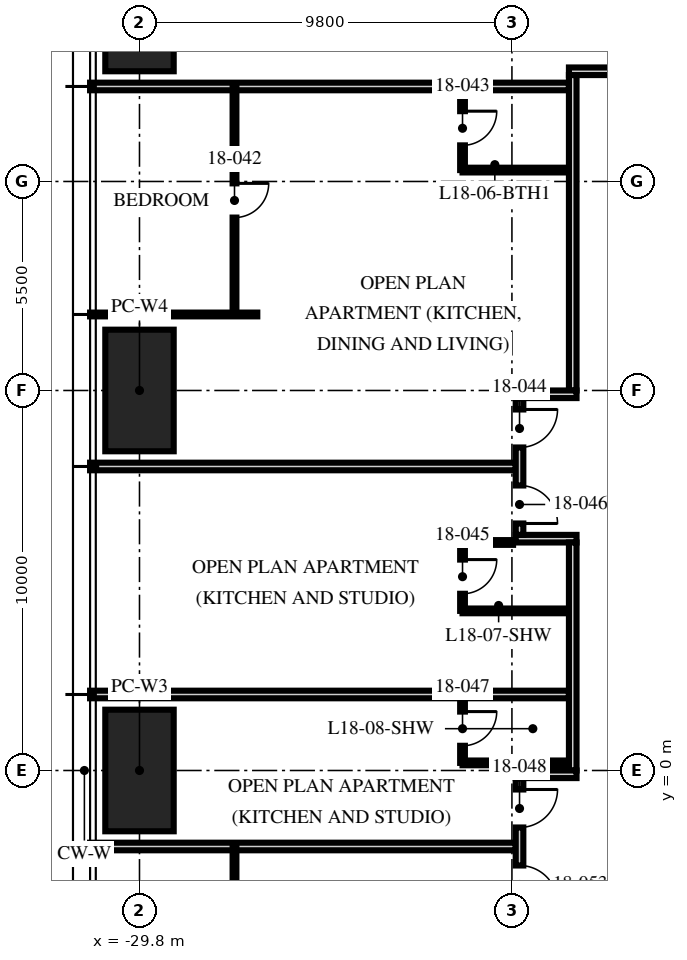
"""IFC4 building model, lengths in metres.
Left out: names, types, materials, properties, quantities, classifications, styles, units other than length and angle.
Written with IfcOpenShell. Run it as: python <this file> out.ifc"""

import sys

from ifc_helpers import new_model, si_unit, direction, frame, frame_2d, origin, origin_2d, place, context, subcontext, project, spatial, rectangle, hollow_rectangle, extrude, element, fill, save


model = new_model("IFC4")
c1 = context("Model", 3, precision=1e-05, world=origin(), true_north=direction((0.0, 1.0)))
c2 = subcontext(c1, "Body", "Model", "MODEL_VIEW")
j1 = project(units=[si_unit("LENGTHUNIT", "METRE"), si_unit("PLANEANGLEUNIT", "RADIAN")], contexts=[c1])
p1 = place(None, origin())
s1 = spatial("IfcSite", under=j1, at=p1, CompositionType="ELEMENT")
p2 = place(p1, origin())
s2 = spatial("IfcBuilding", under=s1, at=p2, CompositionType="ELEMENT")
p3 = place(p2, frame((0.0, 0.0, 73.5)))
s3 = spatial("IfcBuildingStorey", under=s2, at=p3, CompositionType="ELEMENT", Elevation=73.5)
for number, where, z_axis, x_axis in (
    (1, (-29.8, 0.0, 0.0), (0.0, 0.0, 1.0), (0.0, 1.0, 0.0)),
    (2, (-29.8, 10.0, 0.0), (0.0, 0.0, 1.0), (0.0, 1.0, 0.0)),
    (3, (-29.8, 20.0, 0.0), (0.0, 0.0, 1.0), (0.0, 1.0, 0.0)),
):
    element("IfcColumn", number, at=place(p3, frame(where, z_axis=z_axis, x_axis=x_axis)), inside=s3, PredefinedType="COLUMN", context=c2, shape_type="SweptSolid", body=[
        extrude(hollow_rectangle(XDim=3.2, YDim=1.8, WallThickness=0.2, at=origin_2d()), origin(), (0.0, 0.0, 1.0), 3.75),
    ])
p4 = place(p3, frame((-18.5, 18.0, 0.0), z_axis=(0.0, 0.0, 1.0), x_axis=(-1.0, 0.0, 0.0)))
e4 = element("IfcWall", 4, at=p4, inside=s3, PredefinedType="PARTITIONING", context=c2, shape_type="SweptSolid", body=[
    extrude(rectangle(XDim=12.6, YDim=0.2, at=frame_2d((6.3, 0.0))), origin(), (0.0, 0.0, 1.0), 2.3),
])
p5 = place(p3, frame((-26.7, 12.0, 0.0), z_axis=(0.0, 0.0, 1.0), x_axis=(-1.0, 0.0, 0.0)))
e5 = element("IfcWall", 5, at=p5, inside=s3, PredefinedType="PARTITIONING", context=c2, shape_type="SweptSolid", body=[
    extrude(rectangle(XDim=4.4, YDim=0.1, at=frame_2d((2.2, 0.0))), origin(), (0.0, 0.0, 1.0), 2.71),
])
p6 = place(p3, frame((-19.9, 8.0, 0.0), z_axis=(0.0, 0.0, 1.0), x_axis=(-1.0, 0.0, 0.0)))
e6 = element("IfcWall", 6, at=p6, inside=s3, PredefinedType="PARTITIONING", context=c2, shape_type="SweptSolid", body=[
    extrude(rectangle(XDim=11.2, YDim=0.2, at=frame_2d((5.6, 0.0))), origin(), (0.0, 0.0, 1.0), 2.71),
])
p7 = place(p3, frame((-18.5, 2.0, 0.0), z_axis=(0.0, 0.0, 1.0), x_axis=(-1.0, 0.0, 0.0)))
e7 = element("IfcWall", 7, at=p7, inside=s3, PredefinedType="PARTITIONING", context=c2, shape_type="SweptSolid", body=[
    extrude(rectangle(XDim=12.6, YDim=0.2, at=frame_2d((6.3, 0.0))), origin(), (0.0, 0.0, 1.0), 2.71),
])
p8 = place(p3, frame((-19.9, -2.0, 0.0), z_axis=(0.0, 0.0, 1.0), x_axis=(-1.0, 0.0, 0.0)))
e8 = element("IfcWall", 8, at=p8, inside=s3, PredefinedType="PARTITIONING", context=c2, shape_type="SweptSolid", body=[
    extrude(rectangle(XDim=11.2, YDim=0.2, at=frame_2d((5.6, 0.0))), origin(), (0.0, 0.0, 1.0), 2.71),
])
p9 = place(p3, frame((-27.3, 18.0, 0.0), z_axis=(0.0, 0.0, 1.0), x_axis=(0.0, -1.0, 0.0)))
e9 = element("IfcWall", 9, at=p9, inside=s3, PredefinedType="PARTITIONING", context=c2, shape_type="SweptSolid", body=[
    extrude(rectangle(XDim=6.0, YDim=0.1, at=frame_2d((3.0, 0.0))), origin(), (0.0, 0.0, 1.0), 2.61),
])
p10 = place(p9, frame((2.55, 0.0, 0.0)))
e10 = element("IfcOpeningElement", 10, at=p10, cuts=e9, PredefinedType="OPENING", context=c2, shape_type="SweptSolid", body=[
    extrude(rectangle(XDim=0.9, YDim=2.1, at=frame_2d((0.45, 1.05))), frame((0.0, 0.06, 0.0), z_axis=(0.0, -1.0, 0.0), x_axis=(1.0, 0.0, 0.0)), (0.0, 0.0, 1.0), 0.12),
])
p11 = place(p3, frame((-21.3, 18.0, 0.0), z_axis=(0.0, 0.0, 1.0), x_axis=(0.0, -1.0, 0.0)))
e11 = element("IfcWall", 11, at=p11, inside=s3, PredefinedType="PARTITIONING", context=c2, shape_type="SweptSolid", body=[
    extrude(rectangle(XDim=2.2, YDim=0.125, at=frame_2d((1.1, 0.0))), origin(), (0.0, 0.0, 1.0), 3.5),
])
p12 = place(p11, frame((0.65, 0.0, 0.0)))
e12 = element("IfcOpeningElement", 12, at=p12, cuts=e11, PredefinedType="OPENING", context=c2, shape_type="SweptSolid", body=[
    extrude(rectangle(XDim=0.9, YDim=2.1, at=frame_2d((0.45, 1.05))), frame((0.0, 0.073, 0.0), z_axis=(0.0, -1.0, 0.0), x_axis=(1.0, 0.0, 0.0)), (0.0, 0.0, 1.0), 0.145),
])
p13 = place(p3, frame((-18.5, 15.8, 0.0), z_axis=(0.0, 0.0, 1.0), x_axis=(-1.0, 0.0, 0.0)))
e13 = element("IfcWall", 13, at=p13, inside=s3, PredefinedType="PARTITIONING", context=c2, shape_type="SweptSolid", body=[
    extrude(rectangle(XDim=2.8, YDim=0.125, at=frame_2d((1.4, 0.0))), origin(), (0.0, 0.0, 1.0), 3.5),
])
p14 = place(p3, frame((-21.3, 6.0, 0.0), z_axis=(0.0, 0.0, 1.0), x_axis=(0.0, -1.0, 0.0)))
e14 = element("IfcWall", 14, at=p14, inside=s3, PredefinedType="PARTITIONING", context=c2, shape_type="SweptSolid", body=[
    extrude(rectangle(XDim=1.8, YDim=0.125, at=frame_2d((0.9, 0.0))), origin(), (0.0, 0.0, 1.0), 2.61),
])
p15 = place(p14, frame((0.45, 0.0, 0.0)))
e15 = element("IfcOpeningElement", 15, at=p15, cuts=e14, PredefinedType="OPENING", context=c2, shape_type="SweptSolid", body=[
    extrude(rectangle(XDim=0.9, YDim=2.1, at=frame_2d((0.45, 1.05))), frame((0.0, 0.073, 0.0), z_axis=(0.0, -1.0, 0.0), x_axis=(1.0, 0.0, 0.0)), (0.0, 0.0, 1.0), 0.145),
])
p16 = place(p3, frame((-19.97, 6.0, 0.0), z_axis=(0.0, 0.0, 1.0), x_axis=(-1.0, 0.0, 0.0)))
e16 = element("IfcWall", 16, at=p16, inside=s3, PredefinedType="PARTITIONING", context=c2, shape_type="SweptSolid", body=[
    extrude(rectangle(XDim=1.33, YDim=0.125, at=frame_2d((0.665, 0.0))), origin(), (0.0, 0.0, 1.0), 3.5),
])
p17 = place(p3, frame((-18.5, 4.2, 0.0), z_axis=(0.0, 0.0, 1.0), x_axis=(-1.0, 0.0, 0.0)))
e17 = element("IfcWall", 17, at=p17, inside=s3, PredefinedType="PARTITIONING", context=c2, shape_type="SweptSolid", body=[
    extrude(rectangle(XDim=2.8, YDim=0.125, at=frame_2d((1.4, 0.0))), origin(), (0.0, 0.0, 1.0), 3.5),
])
p18 = place(p3, frame((-21.3, 2.0, 0.0), z_axis=(0.0, 0.0, 1.0), x_axis=(0.0, -1.0, 0.0)))
e18 = element("IfcWall", 18, at=p18, inside=s3, PredefinedType="PARTITIONING", context=c2, shape_type="SweptSolid", body=[
    extrude(rectangle(XDim=1.8, YDim=0.125, at=frame_2d((0.9, 0.0))), origin(), (0.0, 0.0, 1.0), 3.5),
])
p19 = place(p18, frame((0.45, 0.0, 0.0)))
e19 = element("IfcOpeningElement", 19, at=p19, cuts=e18, PredefinedType="OPENING", context=c2, shape_type="SweptSolid", body=[
    extrude(rectangle(XDim=0.9, YDim=2.1, at=frame_2d((0.45, 1.05))), frame((0.0, 0.073, 0.0), z_axis=(0.0, -1.0, 0.0), x_axis=(1.0, 0.0, 0.0)), (0.0, 0.0, 1.0), 0.145),
])
p20 = place(p3, frame((-18.5, 0.2, 0.0), z_axis=(0.0, 0.0, 1.0), x_axis=(-1.0, 0.0, 0.0)))
e20 = element("IfcWall", 20, at=p20, inside=s3, PredefinedType="PARTITIONING", context=c2, shape_type="SweptSolid", body=[
    extrude(rectangle(XDim=2.8, YDim=0.125, at=frame_2d((1.4, 0.0))), origin(), (0.0, 0.0, 1.0), 2.492),
])
p21 = place(p3, frame((-27.3, -2.0, 0.0), z_axis=(0.0, 0.0, 1.0), x_axis=(0.0, -1.0, 0.0)))
e21 = element("IfcWall", 21, at=p21, inside=s3, PredefinedType="PARTITIONING", context=c2, shape_type="SweptSolid", body=[
    extrude(rectangle(XDim=6.0, YDim=0.1, at=frame_2d((3.0, 0.0))), origin(), (0.0, 0.0, 1.0), 2.61),
])
p22 = place(p21, frame((2.55, 0.0, 0.0)))
e22 = element("IfcOpeningElement", 22, at=p22, cuts=e21, PredefinedType="OPENING", context=c2, shape_type="SweptSolid", body=[
    extrude(rectangle(XDim=0.9, YDim=2.1, at=frame_2d((0.45, 1.05))), frame((0.0, 0.06, 0.0), z_axis=(0.0, -1.0, 0.0), x_axis=(1.0, 0.0, 0.0)), (0.0, 0.0, 1.0), 0.12),
])
p23 = place(p3, frame((-18.5, 18.4, 0.0), z_axis=(0.0, 0.0, 1.0), x_axis=(1.0, 0.0, 0.0)))
e23 = element("IfcWall", 23, at=p23, inside=s3, PredefinedType="PARTITIONING", context=c2, shape_type="SweptSolid", body=[
    extrude(rectangle(XDim=8.5, YDim=0.2, at=frame_2d((4.25, 0.0))), origin(), (0.0, 0.0, 1.0), 2.3),
])
p24 = place(p3, frame((-18.4, 18.3, 0.0), z_axis=(0.0, 0.0, 1.0), x_axis=(0.0, -1.0, 0.0)))
e24 = element("IfcWall", 24, at=p24, inside=s3, PredefinedType="PARTITIONING", context=c2, shape_type="SweptSolid", body=[
    extrude(rectangle(XDim=8.3, YDim=0.2, at=frame_2d((4.15, 0.0))), origin(), (0.0, 0.0, 1.0), 2.3),
])
p25 = place(p3, frame((-18.3, 9.9, 0.0), z_axis=(0.0, 0.0, 1.0), x_axis=(-1.0, 0.0, 0.0)))
e25 = element("IfcWall", 25, at=p25, inside=s3, PredefinedType="PARTITIONING", context=c2, shape_type="SweptSolid", body=[
    extrude(rectangle(XDim=1.6, YDim=0.2, at=frame_2d((0.8, 0.0))), origin(), (0.0, 0.0, 1.0), 2.492),
])
p26 = place(p3, frame((-18.3, 6.1, 0.0), z_axis=(0.0, 0.0, 1.0), x_axis=(-1.0, 0.0, 0.0)))
e26 = element("IfcWall", 26, at=p26, inside=s3, PredefinedType="PARTITIONING", context=c2, shape_type="SweptSolid", body=[
    extrude(rectangle(XDim=1.6, YDim=0.2, at=frame_2d((0.8, 0.0))), origin(), (0.0, 0.0, 1.0), 3.5),
])
p27 = place(p3, frame((-19.8, 9.8, 0.0), z_axis=(0.0, 0.0, 1.0), x_axis=(0.0, -1.0, 0.0)))
e27 = element("IfcWall", 27, at=p27, inside=s3, PredefinedType="PARTITIONING", context=c2, shape_type="SweptSolid", body=[
    extrude(rectangle(XDim=3.6, YDim=0.2, at=frame_2d((1.8, 0.0))), origin(), (0.0, 0.0, 1.0), 3.5),
])
p28 = place(p27, frame((0.3, 0.0, 0.0)))
e28 = element("IfcOpeningElement", 28, at=p28, cuts=e27, PredefinedType="OPENING", context=c2, shape_type="SweptSolid", body=[
    extrude(rectangle(XDim=1.0, YDim=2.2, at=frame_2d((0.5, 1.1))), frame((0.0, 0.11, 0.0), z_axis=(0.0, -1.0, 0.0), x_axis=(1.0, 0.0, 0.0)), (0.0, 0.0, 1.0), 0.22),
])
p29 = place(p27, frame((2.3, 0.0, 0.0)))
e29 = element("IfcOpeningElement", 29, at=p29, cuts=e27, PredefinedType="OPENING", context=c2, shape_type="SweptSolid", body=[
    extrude(rectangle(XDim=1.0, YDim=2.2, at=frame_2d((0.5, 1.1))), frame((0.0, 0.11, 0.0), z_axis=(0.0, -1.0, 0.0), x_axis=(1.0, 0.0, 0.0)), (0.0, 0.0, 1.0), 0.22),
])
p30 = place(p3, frame((-18.4, 6.0, 0.0), z_axis=(0.0, 0.0, 1.0), x_axis=(0.0, -1.0, 0.0)))
e30 = element("IfcWall", 30, at=p30, inside=s3, PredefinedType="PARTITIONING", context=c2, shape_type="SweptSolid", body=[
    extrude(rectangle(XDim=6.0, YDim=0.2, at=frame_2d((3.0, 0.0))), origin(), (0.0, 0.0, 1.0), 2.492),
])
p31 = place(p3, frame((-18.3, -0.1, 0.0), z_axis=(0.0, 0.0, 1.0), x_axis=(-1.0, 0.0, 0.0)))
e31 = element("IfcWall", 31, at=p31, inside=s3, PredefinedType="PARTITIONING", context=c2, shape_type="SweptSolid", body=[
    extrude(rectangle(XDim=1.6, YDim=0.2, at=frame_2d((0.8, 0.0))), origin(), (0.0, 0.0, 1.0), 2.492),
])
p32 = place(p3, frame((-19.8, -0.2, 0.0), z_axis=(0.0, 0.0, 1.0), x_axis=(0.0, -1.0, 0.0)))
e32 = element("IfcWall", 32, at=p32, inside=s3, PredefinedType="PARTITIONING", context=c2, shape_type="SweptSolid", body=[
    extrude(rectangle(XDim=3.6, YDim=0.2, at=frame_2d((1.8, 0.0))), origin(), (0.0, 0.0, 1.0), 3.5),
])
p33 = place(p32, frame((0.3, 0.0, 0.0)))
e33 = element("IfcOpeningElement", 33, at=p33, cuts=e32, PredefinedType="OPENING", context=c2, shape_type="SweptSolid", body=[
    extrude(rectangle(XDim=1.0, YDim=2.2, at=frame_2d((0.5, 1.1))), frame((0.0, 0.11, 0.0), z_axis=(0.0, -1.0, 0.0), x_axis=(1.0, 0.0, 0.0)), (0.0, 0.0, 1.0), 0.22),
])
p34 = place(p32, frame((2.3, 0.0, 0.0)))
e34 = element("IfcOpeningElement", 34, at=p34, cuts=e32, PredefinedType="OPENING", context=c2, shape_type="SweptSolid", body=[
    extrude(rectangle(XDim=1.0, YDim=2.2, at=frame_2d((0.5, 1.1))), frame((0.0, 0.11, 0.0), z_axis=(0.0, -1.0, 0.0), x_axis=(1.0, 0.0, 0.0)), (0.0, 0.0, 1.0), 0.22),
])
p35 = place(p10, origin())
e35 = element("IfcDoor", 35, at=p35, inside=s3, OperationType="SINGLE_SWING_LEFT", PredefinedType="DOOR", context=c2, shape_type="SweptSolid", body=[
    extrude(rectangle(XDim=0.9, YDim=2.1, at=frame_2d((0.45, 1.05))), frame((0.0, 0.025, 0.0), z_axis=(0.0, -1.0, 0.0), x_axis=(1.0, 0.0, 0.0)), (0.0, 0.0, 1.0), 0.05),
])
fill(e10, e35)
p36 = place(p12, origin())
e36 = element("IfcDoor", 36, at=p36, inside=s3, OperationType="SINGLE_SWING_LEFT", PredefinedType="DOOR", context=c2, shape_type="SweptSolid", body=[
    extrude(rectangle(XDim=0.9, YDim=2.1, at=frame_2d((0.45, 1.05))), frame((0.0, 0.025, 0.0), z_axis=(0.0, -1.0, 0.0), x_axis=(1.0, 0.0, 0.0)), (0.0, 0.0, 1.0), 0.05),
])
fill(e12, e36)
p37 = place(p28, origin())
e37 = element("IfcDoor", 37, at=p37, inside=s3, OperationType="SINGLE_SWING_LEFT", PredefinedType="DOOR", context=c2, shape_type="SweptSolid", body=[
    extrude(rectangle(XDim=1.0, YDim=2.2, at=frame_2d((0.5, 1.1))), frame((0.0, 0.025, 0.0), z_axis=(0.0, -1.0, 0.0), x_axis=(1.0, 0.0, 0.0)), (0.0, 0.0, 1.0), 0.05),
])
fill(e28, e37)
p38 = place(p15, origin())
e38 = element("IfcDoor", 38, at=p38, inside=s3, OperationType="SINGLE_SWING_LEFT", PredefinedType="DOOR", context=c2, shape_type="SweptSolid", body=[
    extrude(rectangle(XDim=0.9, YDim=2.1, at=frame_2d((0.45, 1.05))), frame((0.0, 0.025, 0.0), z_axis=(0.0, -1.0, 0.0), x_axis=(1.0, 0.0, 0.0)), (0.0, 0.0, 1.0), 0.05),
])
fill(e15, e38)
p39 = place(p29, origin())
e39 = element("IfcDoor", 39, at=p39, inside=s3, OperationType="SINGLE_SWING_RIGHT", PredefinedType="DOOR", context=c2, shape_type="SweptSolid", body=[
    extrude(rectangle(XDim=1.0, YDim=2.2, at=frame_2d((0.5, 1.1))), frame((0.0, 0.025, 0.0), z_axis=(0.0, -1.0, 0.0), x_axis=(1.0, 0.0, 0.0)), (0.0, 0.0, 1.0), 0.05),
])
fill(e29, e39)
p40 = place(p19, origin())
e40 = element("IfcDoor", 40, at=p40, inside=s3, OperationType="SINGLE_SWING_LEFT", PredefinedType="DOOR", context=c2, shape_type="SweptSolid", body=[
    extrude(rectangle(XDim=0.9, YDim=2.1, at=frame_2d((0.45, 1.05))), frame((0.0, 0.025, 0.0), z_axis=(0.0, -1.0, 0.0), x_axis=(1.0, 0.0, 0.0)), (0.0, 0.0, 1.0), 0.05),
])
fill(e19, e40)
p41 = place(p33, origin())
e41 = element("IfcDoor", 41, at=p41, inside=s3, OperationType="SINGLE_SWING_LEFT", PredefinedType="DOOR", context=c2, shape_type="SweptSolid", body=[
    extrude(rectangle(XDim=1.0, YDim=2.2, at=frame_2d((0.5, 1.1))), frame((0.0, 0.025, 0.0), z_axis=(0.0, -1.0, 0.0), x_axis=(1.0, 0.0, 0.0)), (0.0, 0.0, 1.0), 0.05),
])
fill(e33, e41)
p42 = place(p34, origin())
e42 = element("IfcDoor", 42, at=p42, inside=s3, OperationType="SINGLE_SWING_RIGHT", PredefinedType="DOOR", context=c2, shape_type="SweptSolid", body=[
    extrude(rectangle(XDim=1.0, YDim=2.2, at=frame_2d((0.5, 1.1))), frame((0.0, 0.025, 0.0), z_axis=(0.0, -1.0, 0.0), x_axis=(1.0, 0.0, 0.0)), (0.0, 0.0, 1.0), 0.05),
])
fill(e34, e42)
save(model, sys.argv[1])
